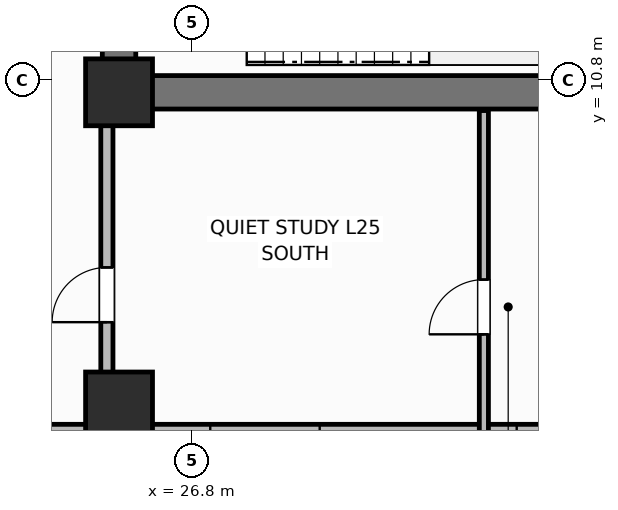
"""IFC4 building model, lengths in metres.
Left out: names, types, materials, properties, quantities, classifications, styles, units other than length and angle.
Written with IfcOpenShell. Run it as: python <this file> out.ifc"""

import sys

from ifc_helpers import new_model, si_unit, direction, frame, frame_2d, origin, origin_2d, place, context, subcontext, project, spatial, rectangle, extrude, element, fill, save


model = new_model("IFC4")
c1 = context("Model", 3, precision=1e-05, world=origin(), true_north=direction((0.0, 1.0)))
c2 = subcontext(c1, "Body", "Model", "MODEL_VIEW")
j1 = project(units=[si_unit("LENGTHUNIT", "METRE"), si_unit("PLANEANGLEUNIT", "RADIAN")], contexts=[c1])
p1 = place(None, origin())
s1 = spatial("IfcSite", under=j1, at=p1, CompositionType="ELEMENT")
p2 = place(p1, origin())
s2 = spatial("IfcBuilding", under=s1, at=p2, CompositionType="ELEMENT")
p3 = place(p2, frame((0.0, 0.0, 103.1)))
s3 = spatial("IfcBuildingStorey", under=s2, at=p3, CompositionType="ELEMENT", Elevation=103.1)
p4 = place(p3, frame((52.8, 10.6, 0.0), z_axis=(0.0, 0.0, 1.0), x_axis=(-1.0, 0.0, 0.0)))
e1 = element("IfcWall", 1, at=p4, inside=s3, PredefinedType="SHEAR", context=c2, shape_type="SweptSolid", body=[
    extrude(rectangle(XDim=27.2, YDim=0.55, at=frame_2d((13.6, 0.0))), origin(), (0.0, 0.0, 1.0), 3.7),
])
p5 = place(p3, frame((25.6, 10.875, 0.0), z_axis=(0.0, 0.0, 1.0), x_axis=(0.0, 1.0, 0.0)))
e2 = element("IfcWall", 2, at=p5, inside=s3, PredefinedType="SHEAR", context=c2, shape_type="SweptSolid", body=[
    extrude(rectangle(XDim=5.65, YDim=0.55, at=frame_2d((2.825, 0.0))), origin(), (0.0, 0.0, 1.0), 3.7),
])
for number, where, z_axis, x_axis in (
    (3, (25.6, 10.6, 0.0), (0.0, 0.0, 1.0), (1.0, 0.0, 0.0)),
    (4, (25.6, 5.45, 0.0), (0.0, 0.0, 1.0), (1.0, 0.0, 0.0)),
):
    element("IfcColumn", number, at=place(p3, frame(where, z_axis=z_axis, x_axis=x_axis)), inside=s3, PredefinedType="COLUMN", context=c2, shape_type="SweptSolid", body=[
        extrude(rectangle(XDim=1.1, YDim=1.1, at=origin_2d()), origin(), (0.0, 0.0, 1.0), 3.7),
    ])
p6 = place(p3, frame((18.6, 4.97, 0.0), z_axis=(0.0, 0.0, 1.0), x_axis=(1.0, 0.0, 0.0)))
e5 = element("IfcWall", 5, at=p6, inside=s3, PredefinedType="SOLIDWALL", context=c2, shape_type="SweptSolid", body=[
    extrude(rectangle(XDim=17.4, YDim=0.34, at=frame_2d((8.7, 0.0))), origin(), (0.0, 0.0, 1.0), 2.7),
])
p7 = place(p6, frame((1.36, 0.0, 0.73)))
e6 = element("IfcOpeningElement", 6, at=p7, cuts=e5, PredefinedType="OPENING", context=c2, shape_type="SweptSolid", body=[
    extrude(rectangle(XDim=1.8, YDim=1.85, at=frame_2d((0.9, 0.925))), frame((0.0, 0.18, 0.0), z_axis=(0.0, -1.0, 0.0), x_axis=(1.0, 0.0, 0.0)), (0.0, 0.0, 1.0), 0.36),
])
p8 = place(p6, frame((8.5, 0.0, 0.73)))
e7 = element("IfcOpeningElement", 7, at=p8, cuts=e5, PredefinedType="OPENING", context=c2, shape_type="SweptSolid", body=[
    extrude(rectangle(XDim=1.8, YDim=1.85, at=frame_2d((0.9, 0.925))), frame((0.0, 0.18, 0.0), z_axis=(0.0, -1.0, 0.0), x_axis=(1.0, 0.0, 0.0)), (0.0, 0.0, 1.0), 0.36),
])
p9 = place(p6, frame((13.54, 0.0, 0.73)))
e8 = element("IfcOpeningElement", 8, at=p9, cuts=e5, PredefinedType="OPENING", context=c2, shape_type="SweptSolid", body=[
    extrude(rectangle(XDim=1.8, YDim=1.85, at=frame_2d((0.9, 0.925))), frame((0.0, 0.18, 0.0), z_axis=(0.0, -1.0, 0.0), x_axis=(1.0, 0.0, 0.0)), (0.0, 0.0, 1.0), 0.36),
])
p10 = place(p3, frame((31.6, 4.97, 0.0), z_axis=(0.0, 0.0, 1.0), x_axis=(0.0, 1.0, 0.0)))
e9 = element("IfcWall", 9, at=p10, inside=s3, PredefinedType="PARTITIONING", context=c2, shape_type="SweptSolid", body=[
    extrude(rectangle(XDim=5.33, YDim=0.15, at=frame_2d((2.665, 0.0))), origin(), (0.0, 0.0, 1.0), 2.53),
])
p11 = place(p10, frame((1.65, 0.0, 0.0)))
e10 = element("IfcOpeningElement", 10, at=p11, cuts=e9, PredefinedType="OPENING", context=c2, shape_type="SweptSolid", body=[
    extrude(rectangle(XDim=0.9, YDim=2.1, at=frame_2d((0.45, 1.05))), frame((0.0, 0.085, 0.0), z_axis=(0.0, -1.0, 0.0), x_axis=(1.0, 0.0, 0.0)), (0.0, 0.0, 1.0), 0.17),
])
p12 = place(p3, frame((25.4, 5.97, 0.0), z_axis=(0.0, 0.0, 1.0), x_axis=(0.0, 1.0, 0.0)))
e11 = element("IfcWall", 11, at=p12, inside=s3, PredefinedType="PARTITIONING", context=c2, shape_type="SweptSolid", body=[
    extrude(rectangle(XDim=4.33, YDim=0.2, at=frame_2d((2.165, 0.0))), origin(), (0.0, 0.0, 1.0), 2.53),
])
p13 = place(p12, frame((0.85, 0.0, 0.0)))
e12 = element("IfcOpeningElement", 12, at=p13, cuts=e11, PredefinedType="OPENING", context=c2, shape_type="SweptSolid", body=[
    extrude(rectangle(XDim=0.9, YDim=2.1, at=frame_2d((0.45, 1.05))), frame((0.0, 0.11, 0.0), z_axis=(0.0, -1.0, 0.0), x_axis=(1.0, 0.0, 0.0)), (0.0, 0.0, 1.0), 0.22),
])
p14 = place(p11, origin())
e13 = element("IfcDoor", 13, at=p14, inside=s3, OperationType="SINGLE_SWING_LEFT", PredefinedType="DOOR", context=c2, shape_type="SweptSolid", body=[
    extrude(rectangle(XDim=0.9, YDim=2.1, at=frame_2d((0.45, 1.05))), frame((0.0, 0.025, 0.0), z_axis=(0.0, -1.0, 0.0), x_axis=(1.0, 0.0, 0.0)), (0.0, 0.0, 1.0), 0.05),
])
fill(e10, e13)
p15 = place(p13, origin())
e14 = element("IfcDoor", 14, at=p15, inside=s3, OperationType="SINGLE_SWING_LEFT", PredefinedType="DOOR", context=c2, shape_type="SweptSolid", body=[
    extrude(rectangle(XDim=0.9, YDim=2.1, at=frame_2d((0.45, 1.05))), frame((0.0, 0.025, 0.0), z_axis=(0.0, -1.0, 0.0), x_axis=(1.0, 0.0, 0.0)), (0.0, 0.0, 1.0), 0.05),
])
fill(e12, e14)
save(model, sys.argv[1])
